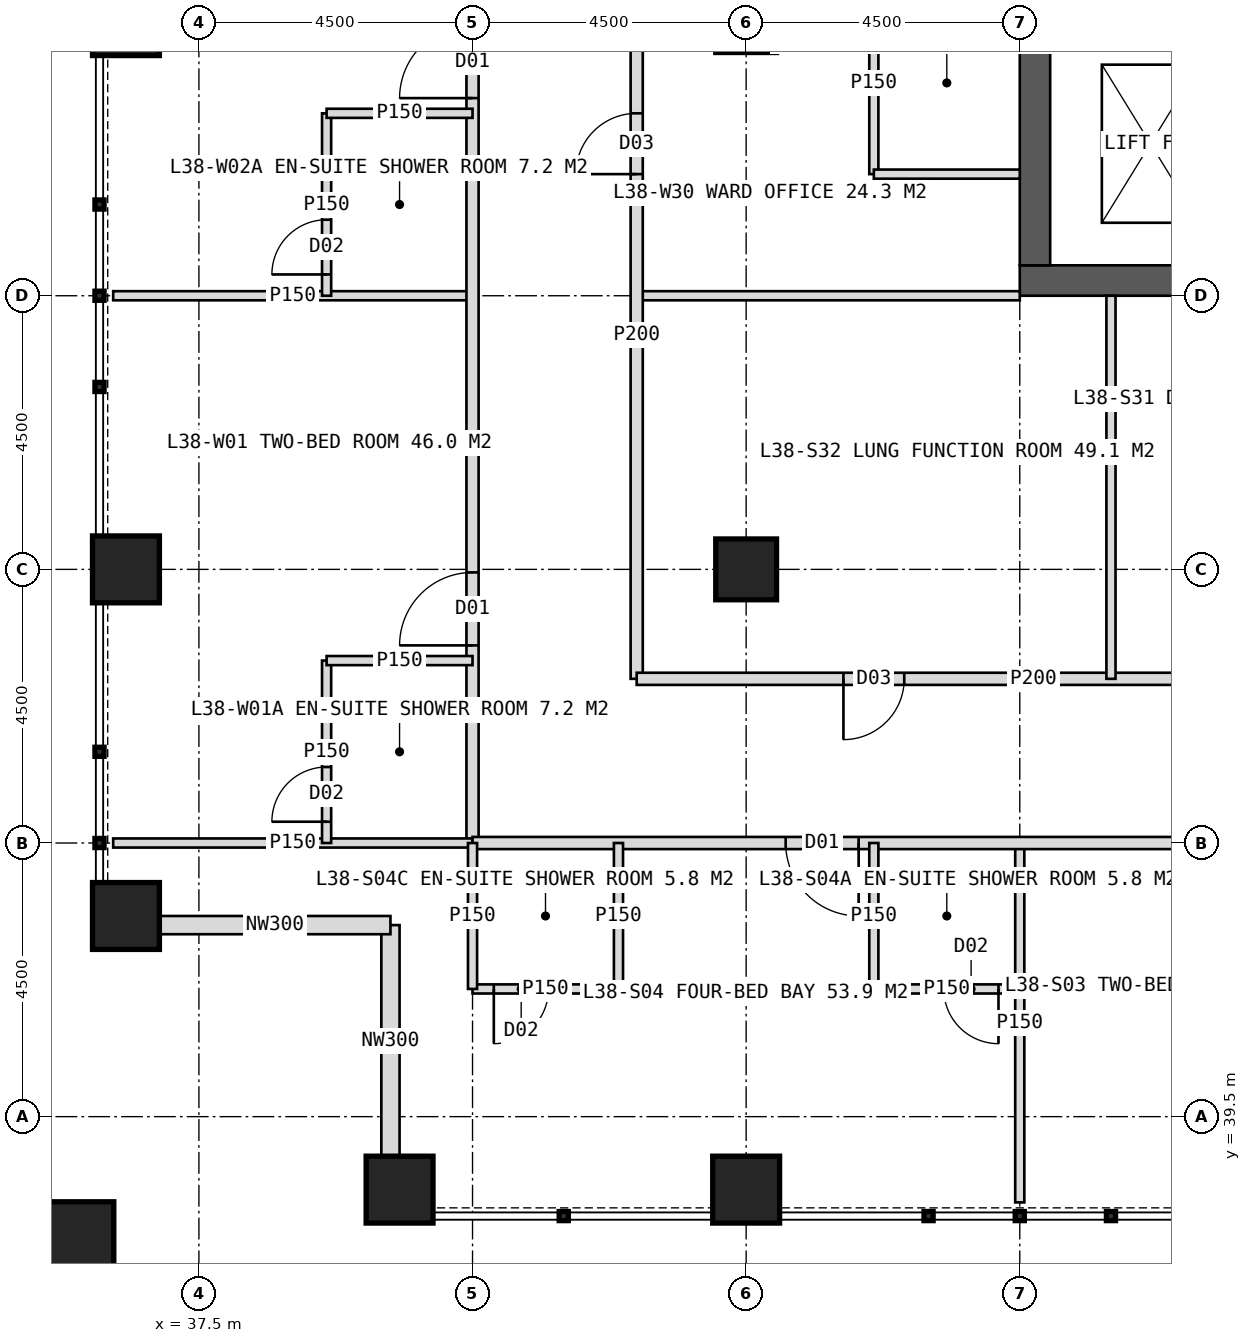
"""IFC4 building model, lengths in metres.
Left out: names, types, materials, properties, quantities, classifications, styles, units other than length and angle.
Written with IfcOpenShell. Run it as: python <this file> out.ifc"""

import sys

from ifc_helpers import new_model, si_unit, direction, frame, frame_2d, origin, origin_2d, place, context, subcontext, project, spatial, rectangle, hollow_rectangle, extrude, element, fill, save


model = new_model("IFC4")
c1 = context("Model", 3, precision=1e-05, world=origin(), true_north=direction((0.0, 1.0)))
c2 = subcontext(c1, "Body", "Model", "MODEL_VIEW")
j1 = project(units=[si_unit("LENGTHUNIT", "METRE"), si_unit("PLANEANGLEUNIT", "RADIAN")], contexts=[c1])
p1 = place(None, origin())
s1 = spatial("IfcSite", under=j1, at=p1, CompositionType="ELEMENT")
p2 = place(p1, origin())
s2 = spatial("IfcBuilding", under=s1, at=p2, CompositionType="ELEMENT")
p3 = place(p2, frame((0.0, 0.0, 160.0)))
s3 = spatial("IfcBuildingStorey", under=s2, at=p3, CompositionType="ELEMENT", Elevation=160.0)
p4 = place(p3, frame((51.0, 53.25, 0.0), z_axis=(0.0, 0.0, 1.0), x_axis=(1.0, 0.0, 0.0)))
e1 = element("IfcWall", 1, at=p4, inside=s3, PredefinedType="SHEAR", context=c2, shape_type="SweptSolid", body=[
    extrude(rectangle(XDim=18.0, YDim=0.5, at=frame_2d((9.0, 0.0))), origin(), (0.0, 0.0, 1.0), 4.0),
])
p5 = place(p4, frame((8.1, 0.0, 0.0)))
e2 = element("IfcOpeningElement", 2, at=p5, cuts=e1, PredefinedType="OPENING", context=c2, shape_type="SweptSolid", body=[
    extrude(rectangle(XDim=1.8, YDim=2.2, at=frame_2d((0.9, 1.1))), frame((0.0, 0.26, 0.0), z_axis=(0.0, -1.0, 0.0), x_axis=(1.0, 0.0, 0.0)), (0.0, 0.0, 1.0), 0.52),
])
p6 = place(p3, frame((51.25, 53.5, 0.0), z_axis=(0.0, 0.0, 1.0), x_axis=(0.0, 1.0, 0.0)))
e3 = element("IfcWall", 3, at=p6, inside=s3, PredefinedType="SHEAR", context=c2, shape_type="SweptSolid", body=[
    extrude(rectangle(XDim=17.0, YDim=0.5, at=frame_2d((8.5, 0.0))), origin(), (0.0, 0.0, 1.0), 4.0),
])
p7 = place(p6, frame((6.0, 0.0, 0.0)))
e4 = element("IfcOpeningElement", 4, at=p7, cuts=e3, PredefinedType="OPENING", context=c2, shape_type="SweptSolid", body=[
    extrude(rectangle(XDim=1.5, YDim=2.2, at=frame_2d((0.75, 1.1))), frame((0.0, 0.26, 0.0), z_axis=(0.0, -1.0, 0.0), x_axis=(1.0, 0.0, 0.0)), (0.0, 0.0, 1.0), 0.52),
])
p8 = place(p3, frame((46.5, 48.5, 0.0), z_axis=(0.0, 0.0, 1.0), x_axis=(1.0, 0.0, 0.0)))
e5 = element("IfcColumn", 5, at=p8, inside=s3, PredefinedType="COLUMN", context=c2, shape_type="SweptSolid", body=[
    extrude(hollow_rectangle(XDim=1.0, YDim=1.0, WallThickness=0.1, at=origin_2d()), origin(), (0.0, 0.0, 1.0), 4.0),
])
for number, where, z_axis, x_axis in (
    (6, (40.8, 38.3, 0.0), (0.0, 0.0, 1.0), (1.0, 0.0, 0.0)),
    (7, (36.3, 42.8, 0.0), (0.0, 0.0, 1.0), (1.0, 0.0, 0.0)),
    (8, (46.5, 38.3, 0.0), (0.0, 0.0, 1.0), (1.0, 0.0, 0.0)),
    (9, (36.3, 48.5, 0.0), (0.0, 0.0, 1.0), (1.0, 0.0, 0.0)),
    (10, (36.3, 57.5, 0.0), (0.0, 0.0, 1.0), (1.0, 0.0, 0.0)),
):
    element("IfcColumn", number, at=place(p3, frame(where, z_axis=z_axis, x_axis=x_axis)), inside=s3, PredefinedType="COLUMN", context=c2, shape_type="SweptSolid", body=[
        extrude(hollow_rectangle(XDim=1.1, YDim=1.1, WallThickness=0.1, at=origin_2d()), origin(), (0.0, 0.0, 1.0), 4.0),
    ])
p9 = place(p3, frame((35.4, 37.4, 0.0), z_axis=(0.0, 0.0, 1.0), x_axis=(1.0, 0.0, 0.0)))
e11 = element("IfcColumn", 11, at=p9, inside=s3, PredefinedType="COLUMN", context=c2, shape_type="SweptSolid", body=[
    extrude(hollow_rectangle(XDim=1.4, YDim=1.4, WallThickness=0.08, at=origin_2d()), origin(), (0.0, 0.0, 1.0), 4.0),
])
for number, where, z_axis, x_axis in (
    (12, (40.65, 38.85, 0.0), (0.0, 0.0, 1.0), (0.0, 1.0, 0.0)),
    (13, (40.65, 42.65, 0.0), (0.0, 0.0, 1.0), (-1.0, 0.0, 0.0)),
):
    element("IfcWall", number, at=place(p3, frame(where, z_axis=z_axis, x_axis=x_axis)), inside=s3, PredefinedType="ELEMENTEDWALL", context=c2, shape_type="SweptSolid", body=[
        extrude(rectangle(XDim=3.8, YDim=0.3, at=frame_2d((1.9, 0.0))), origin(), (0.0, 0.0, 1.0), 4.0),
    ])
p10 = place(p3, frame((42.0, 53.0, 0.0), z_axis=(0.0, 0.0, 1.0), x_axis=(-1.0, 0.0, 0.0)))
e14 = element("IfcWall", 14, at=p10, inside=s3, PredefinedType="PARTITIONING", context=c2, shape_type="SweptSolid", body=[
    extrude(rectangle(XDim=5.91, YDim=0.15, at=frame_2d((2.955, 0.0))), origin(), (0.0, 0.0, 1.0), 3.75),
])
p11 = place(p3, frame((42.0, 44.0, 0.0), z_axis=(0.0, 0.0, 1.0), x_axis=(0.0, 1.0, 0.0)))
e15 = element("IfcWall", 15, at=p11, inside=s3, PredefinedType="PARTITIONING", context=c2, shape_type="SweptSolid", body=[
    extrude(rectangle(XDim=36.0, YDim=0.2, at=frame_2d((18.0, 0.0))), origin(), (0.0, 0.0, 1.0), 3.75),
])
p12 = place(p11, frame((3.25, 0.0, 0.0)))
e16 = element("IfcOpeningElement", 16, at=p12, cuts=e15, PredefinedType="OPENING", context=c2, shape_type="SweptSolid", body=[
    extrude(rectangle(XDim=1.2, YDim=2.2, at=frame_2d((0.6, 1.1))), frame((0.0, 0.11, 0.0), z_axis=(0.0, -1.0, 0.0), x_axis=(1.0, 0.0, 0.0)), (0.0, 0.0, 1.0), 0.22),
])
p13 = place(p11, frame((12.25, 0.0, 0.0)))
e17 = element("IfcOpeningElement", 17, at=p13, cuts=e15, PredefinedType="OPENING", context=c2, shape_type="SweptSolid", body=[
    extrude(rectangle(XDim=1.2, YDim=2.2, at=frame_2d((0.6, 1.1))), frame((0.0, 0.11, 0.0), z_axis=(0.0, -1.0, 0.0), x_axis=(1.0, 0.0, 0.0)), (0.0, 0.0, 1.0), 0.22),
])
p14 = place(p11, frame((21.25, 0.0, 0.0)))
e18 = element("IfcOpeningElement", 18, at=p14, cuts=e15, PredefinedType="OPENING", context=c2, shape_type="SweptSolid", body=[
    extrude(rectangle(XDim=1.2, YDim=2.2, at=frame_2d((0.6, 1.1))), frame((0.0, 0.11, 0.0), z_axis=(0.0, -1.0, 0.0), x_axis=(1.0, 0.0, 0.0)), (0.0, 0.0, 1.0), 0.22),
])
p15 = place(p11, frame((31.75, 0.0, 0.0)))
e19 = element("IfcOpeningElement", 19, at=p15, cuts=e15, PredefinedType="OPENING", context=c2, shape_type="SweptSolid", body=[
    extrude(rectangle(XDim=1.2, YDim=2.2, at=frame_2d((0.6, 1.1))), frame((0.0, 0.11, 0.0), z_axis=(0.0, -1.0, 0.0), x_axis=(1.0, 0.0, 0.0)), (0.0, 0.0, 1.0), 0.22),
])
p16 = place(p3, frame((42.0, 44.0, 0.0), z_axis=(0.0, 0.0, 1.0), x_axis=(-1.0, 0.0, 0.0)))
e20 = element("IfcWall", 20, at=p16, inside=s3, PredefinedType="PARTITIONING", context=c2, shape_type="SweptSolid", body=[
    extrude(rectangle(XDim=5.91, YDim=0.15, at=frame_2d((2.955, 0.0))), origin(), (0.0, 0.0, 1.0), 3.75),
])
p17 = place(p3, frame((39.6, 44.0, 0.0), z_axis=(0.0, 0.0, 1.0), x_axis=(0.0, 1.0, 0.0)))
e21 = element("IfcWall", 21, at=p17, inside=s3, PredefinedType="PARTITIONING", context=c2, shape_type="SweptSolid", body=[
    extrude(rectangle(XDim=3.0, YDim=0.15, at=frame_2d((1.5, 0.0))), origin(), (0.0, 0.0, 1.0), 3.75),
])
p18 = place(p17, frame((0.35, 0.0, 0.0)))
e22 = element("IfcOpeningElement", 22, at=p18, cuts=e21, PredefinedType="OPENING", context=c2, shape_type="SweptSolid", body=[
    extrude(rectangle(XDim=0.9, YDim=2.1, at=frame_2d((0.45, 1.05))), frame((0.0, 0.085, 0.0), z_axis=(0.0, -1.0, 0.0), x_axis=(1.0, 0.0, 0.0)), (0.0, 0.0, 1.0), 0.17),
])
p19 = place(p3, frame((42.0, 47.0, 0.0), z_axis=(0.0, 0.0, 1.0), x_axis=(-1.0, 0.0, 0.0)))
e23 = element("IfcWall", 23, at=p19, inside=s3, PredefinedType="PARTITIONING", context=c2, shape_type="SweptSolid", body=[
    extrude(rectangle(XDim=2.4, YDim=0.15, at=frame_2d((1.2, 0.0))), origin(), (0.0, 0.0, 1.0), 3.75),
])
p20 = place(p3, frame((39.6, 53.0, 0.0), z_axis=(0.0, 0.0, 1.0), x_axis=(0.0, 1.0, 0.0)))
e24 = element("IfcWall", 24, at=p20, inside=s3, PredefinedType="PARTITIONING", context=c2, shape_type="SweptSolid", body=[
    extrude(rectangle(XDim=3.0, YDim=0.15, at=frame_2d((1.5, 0.0))), origin(), (0.0, 0.0, 1.0), 3.75),
])
p21 = place(p20, frame((0.35, 0.0, 0.0)))
e25 = element("IfcOpeningElement", 25, at=p21, cuts=e24, PredefinedType="OPENING", context=c2, shape_type="SweptSolid", body=[
    extrude(rectangle(XDim=0.9, YDim=2.1, at=frame_2d((0.45, 1.05))), frame((0.0, 0.085, 0.0), z_axis=(0.0, -1.0, 0.0), x_axis=(1.0, 0.0, 0.0)), (0.0, 0.0, 1.0), 0.17),
])
p22 = place(p3, frame((42.0, 56.0, 0.0), z_axis=(0.0, 0.0, 1.0), x_axis=(-1.0, 0.0, 0.0)))
e26 = element("IfcWall", 26, at=p22, inside=s3, PredefinedType="PARTITIONING", context=c2, shape_type="SweptSolid", body=[
    extrude(rectangle(XDim=2.4, YDim=0.15, at=frame_2d((1.2, 0.0))), origin(), (0.0, 0.0, 1.0), 3.75),
])
p23 = place(p3, frame((51.0, 53.0, 0.0), z_axis=(0.0, 0.0, 1.0), x_axis=(-1.0, 0.0, 0.0)))
e27 = element("IfcWall", 27, at=p23, inside=s3, PredefinedType="PARTITIONING", context=c2, shape_type="SweptSolid", body=[
    extrude(rectangle(XDim=6.3, YDim=0.15, at=frame_2d((3.15, 0.0))), origin(), (0.0, 0.0, 1.0), 3.75),
])
p24 = place(p3, frame((44.7, 46.7, 0.0), z_axis=(0.0, 0.0, 1.0), x_axis=(0.0, 1.0, 0.0)))
e28 = element("IfcWall", 28, at=p24, inside=s3, PredefinedType="PARTITIONING", context=c2, shape_type="SweptSolid", body=[
    extrude(rectangle(XDim=11.3, YDim=0.2, at=frame_2d((5.65, 0.0))), origin(), (0.0, 0.0, 1.0), 3.75),
])
p25 = place(p24, frame((8.3, 0.0, 0.0)))
e29 = element("IfcOpeningElement", 29, at=p25, cuts=e28, PredefinedType="OPENING", context=c2, shape_type="SweptSolid", body=[
    extrude(rectangle(XDim=1.0, YDim=2.1, at=frame_2d((0.5, 1.05))), frame((0.0, 0.11, 0.0), z_axis=(0.0, -1.0, 0.0), x_axis=(1.0, 0.0, 0.0)), (0.0, 0.0, 1.0), 0.22),
])
p26 = place(p3, frame((48.6, 55.0, 0.0), z_axis=(0.0, 0.0, 1.0), x_axis=(0.0, 1.0, 0.0)))
e30 = element("IfcWall", 30, at=p26, inside=s3, PredefinedType="PARTITIONING", context=c2, shape_type="SweptSolid", body=[
    extrude(rectangle(XDim=3.0, YDim=0.15, at=frame_2d((1.5, 0.0))), origin(), (0.0, 0.0, 1.0), 3.75),
])
p27 = place(p3, frame((51.0, 55.0, 0.0), z_axis=(0.0, 0.0, 1.0), x_axis=(-1.0, 0.0, 0.0)))
e31 = element("IfcWall", 31, at=p27, inside=s3, PredefinedType="PARTITIONING", context=c2, shape_type="SweptSolid", body=[
    extrude(rectangle(XDim=2.4, YDim=0.15, at=frame_2d((1.2, 0.0))), origin(), (0.0, 0.0, 1.0), 3.75),
])
p28 = place(p3, frame((51.0, 44.0, 0.0), z_axis=(0.0, 0.0, 1.0), x_axis=(0.0, -1.0, 0.0)))
e32 = element("IfcWall", 32, at=p28, inside=s3, PredefinedType="PARTITIONING", context=c2, shape_type="SweptSolid", body=[
    extrude(rectangle(XDim=5.91, YDim=0.15, at=frame_2d((2.955, 0.0))), origin(), (0.0, 0.0, 1.0), 3.75),
])
p29 = place(p3, frame((78.0, 44.0, 0.0), z_axis=(0.0, 0.0, 1.0), x_axis=(-1.0, 0.0, 0.0)))
e33 = element("IfcWall", 33, at=p29, inside=s3, PredefinedType="PARTITIONING", context=c2, shape_type="SweptSolid", body=[
    extrude(rectangle(XDim=36.0, YDim=0.2, at=frame_2d((18.0, 0.0))), origin(), (0.0, 0.0, 1.0), 3.75),
])
p30 = place(p29, frame((3.25, 0.0, 0.0)))
e34 = element("IfcOpeningElement", 34, at=p30, cuts=e33, PredefinedType="OPENING", context=c2, shape_type="SweptSolid", body=[
    extrude(rectangle(XDim=1.2, YDim=2.2, at=frame_2d((0.6, 1.1))), frame((0.0, 0.11, 0.0), z_axis=(0.0, -1.0, 0.0), x_axis=(1.0, 0.0, 0.0)), (0.0, 0.0, 1.0), 0.22),
])
p31 = place(p29, frame((12.25, 0.0, 0.0)))
e35 = element("IfcOpeningElement", 35, at=p31, cuts=e33, PredefinedType="OPENING", context=c2, shape_type="SweptSolid", body=[
    extrude(rectangle(XDim=1.2, YDim=2.2, at=frame_2d((0.6, 1.1))), frame((0.0, 0.11, 0.0), z_axis=(0.0, -1.0, 0.0), x_axis=(1.0, 0.0, 0.0)), (0.0, 0.0, 1.0), 0.22),
])
p32 = place(p29, frame((21.25, 0.0, 0.0)))
e36 = element("IfcOpeningElement", 36, at=p32, cuts=e33, PredefinedType="OPENING", context=c2, shape_type="SweptSolid", body=[
    extrude(rectangle(XDim=1.2, YDim=2.2, at=frame_2d((0.6, 1.1))), frame((0.0, 0.11, 0.0), z_axis=(0.0, -1.0, 0.0), x_axis=(1.0, 0.0, 0.0)), (0.0, 0.0, 1.0), 0.22),
])
p33 = place(p29, frame((29.65, 0.0, 0.0)))
e37 = element("IfcOpeningElement", 37, at=p33, cuts=e33, PredefinedType="OPENING", context=c2, shape_type="SweptSolid", body=[
    extrude(rectangle(XDim=1.2, YDim=2.2, at=frame_2d((0.6, 1.1))), frame((0.0, 0.11, 0.0), z_axis=(0.0, -1.0, 0.0), x_axis=(1.0, 0.0, 0.0)), (0.0, 0.0, 1.0), 0.22),
])
p34 = place(p3, frame((51.0, 41.6, 0.0), z_axis=(0.0, 0.0, 1.0), x_axis=(-1.0, 0.0, 0.0)))
e38 = element("IfcWall", 38, at=p34, inside=s3, PredefinedType="PARTITIONING", context=c2, shape_type="SweptSolid", body=[
    extrude(rectangle(XDim=2.4, YDim=0.15, at=frame_2d((1.2, 0.0))), origin(), (0.0, 0.0, 1.0), 3.75),
])
p35 = place(p34, frame((0.35, 0.0, 0.0)))
e39 = element("IfcOpeningElement", 39, at=p35, cuts=e38, PredefinedType="OPENING", context=c2, shape_type="SweptSolid", body=[
    extrude(rectangle(XDim=0.9, YDim=2.1, at=frame_2d((0.45, 1.05))), frame((0.0, 0.085, 0.0), z_axis=(0.0, -1.0, 0.0), x_axis=(1.0, 0.0, 0.0)), (0.0, 0.0, 1.0), 0.17),
])
p36 = place(p3, frame((48.6, 44.0, 0.0), z_axis=(0.0, 0.0, 1.0), x_axis=(0.0, -1.0, 0.0)))
e40 = element("IfcWall", 40, at=p36, inside=s3, PredefinedType="PARTITIONING", context=c2, shape_type="SweptSolid", body=[
    extrude(rectangle(XDim=2.4, YDim=0.15, at=frame_2d((1.2, 0.0))), origin(), (0.0, 0.0, 1.0), 3.75),
])
p37 = place(p3, frame((44.4, 41.6, 0.0), z_axis=(0.0, 0.0, 1.0), x_axis=(-1.0, 0.0, 0.0)))
e41 = element("IfcWall", 41, at=p37, inside=s3, PredefinedType="PARTITIONING", context=c2, shape_type="SweptSolid", body=[
    extrude(rectangle(XDim=2.4, YDim=0.15, at=frame_2d((1.2, 0.0))), origin(), (0.0, 0.0, 1.0), 3.75),
])
p38 = place(p37, frame((1.15, 0.0, 0.0)))
e42 = element("IfcOpeningElement", 42, at=p38, cuts=e41, PredefinedType="OPENING", context=c2, shape_type="SweptSolid", body=[
    extrude(rectangle(XDim=0.9, YDim=2.1, at=frame_2d((0.45, 1.05))), frame((0.0, 0.085, 0.0), z_axis=(0.0, -1.0, 0.0), x_axis=(1.0, 0.0, 0.0)), (0.0, 0.0, 1.0), 0.17),
])
for number, where, z_axis, x_axis in (
    (43, (44.4, 44.0, 0.0), (0.0, 0.0, 1.0), (0.0, -1.0, 0.0)),
    (44, (42.0, 44.0, 0.0), (0.0, 0.0, 1.0), (0.0, -1.0, 0.0)),
):
    element("IfcWall", number, at=place(p3, frame(where, z_axis=z_axis, x_axis=x_axis)), inside=s3, PredefinedType="PARTITIONING", context=c2, shape_type="SweptSolid", body=[
        extrude(rectangle(XDim=2.4, YDim=0.15, at=frame_2d((1.2, 0.0))), origin(), (0.0, 0.0, 1.0), 3.75),
    ])
p39 = place(p3, frame((57.75, 46.7, 0.0), z_axis=(0.0, 0.0, 1.0), x_axis=(-1.0, 0.0, 0.0)))
e45 = element("IfcWall", 45, at=p39, inside=s3, PredefinedType="PARTITIONING", context=c2, shape_type="SweptSolid", body=[
    extrude(rectangle(XDim=13.05, YDim=0.2, at=frame_2d((6.525, 0.0))), origin(), (0.0, 0.0, 1.0), 3.75),
])
p40 = place(p39, frame((2.125, 0.0, 0.0)))
e46 = element("IfcOpeningElement", 46, at=p40, cuts=e45, PredefinedType="OPENING", context=c2, shape_type="SweptSolid", body=[
    extrude(rectangle(XDim=1.0, YDim=2.1, at=frame_2d((0.5, 1.05))), frame((0.0, 0.11, 0.0), z_axis=(0.0, -1.0, 0.0), x_axis=(1.0, 0.0, 0.0)), (0.0, 0.0, 1.0), 0.22),
])
p41 = place(p39, frame((8.65, 0.0, 0.0)))
e47 = element("IfcOpeningElement", 47, at=p41, cuts=e45, PredefinedType="OPENING", context=c2, shape_type="SweptSolid", body=[
    extrude(rectangle(XDim=1.0, YDim=2.1, at=frame_2d((0.5, 1.05))), frame((0.0, 0.11, 0.0), z_axis=(0.0, -1.0, 0.0), x_axis=(1.0, 0.0, 0.0)), (0.0, 0.0, 1.0), 0.22),
])
p42 = place(p3, frame((52.5, 53.0, 0.0), z_axis=(0.0, 0.0, 1.0), x_axis=(0.0, -1.0, 0.0)))
e48 = element("IfcWall", 48, at=p42, inside=s3, PredefinedType="PARTITIONING", context=c2, shape_type="SweptSolid", body=[
    extrude(rectangle(XDim=6.3, YDim=0.15, at=frame_2d((3.15, 0.0))), origin(), (0.0, 0.0, 1.0), 3.75),
])
p43 = place(p12, origin())
e49 = element("IfcDoor", 49, at=p43, inside=s3, OperationType="SINGLE_SWING_LEFT", PredefinedType="DOOR", context=c2, shape_type="SweptSolid", body=[
    extrude(rectangle(XDim=1.2, YDim=2.2, at=frame_2d((0.6, 1.1))), frame((0.0, 0.025, 0.0), z_axis=(0.0, -1.0, 0.0), x_axis=(1.0, 0.0, 0.0)), (0.0, 0.0, 1.0), 0.05),
])
fill(e16, e49)
p44 = place(p18, origin())
e50 = element("IfcDoor", 50, at=p44, inside=s3, OperationType="SINGLE_SWING_LEFT", PredefinedType="DOOR", context=c2, shape_type="SweptSolid", body=[
    extrude(rectangle(XDim=0.9, YDim=2.1, at=frame_2d((0.45, 1.05))), frame((0.0, 0.025, 0.0), z_axis=(0.0, -1.0, 0.0), x_axis=(1.0, 0.0, 0.0)), (0.0, 0.0, 1.0), 0.05),
])
fill(e22, e50)
p45 = place(p13, origin())
e51 = element("IfcDoor", 51, at=p45, inside=s3, OperationType="SINGLE_SWING_LEFT", PredefinedType="DOOR", context=c2, shape_type="SweptSolid", body=[
    extrude(rectangle(XDim=1.2, YDim=2.2, at=frame_2d((0.6, 1.1))), frame((0.0, 0.025, 0.0), z_axis=(0.0, -1.0, 0.0), x_axis=(1.0, 0.0, 0.0)), (0.0, 0.0, 1.0), 0.05),
])
fill(e17, e51)
p46 = place(p21, origin())
e52 = element("IfcDoor", 52, at=p46, inside=s3, OperationType="SINGLE_SWING_LEFT", PredefinedType="DOOR", context=c2, shape_type="SweptSolid", body=[
    extrude(rectangle(XDim=0.9, YDim=2.1, at=frame_2d((0.45, 1.05))), frame((0.0, 0.025, 0.0), z_axis=(0.0, -1.0, 0.0), x_axis=(1.0, 0.0, 0.0)), (0.0, 0.0, 1.0), 0.05),
])
fill(e25, e52)
p47 = place(p25, origin())
e53 = element("IfcDoor", 53, at=p47, inside=s3, OperationType="SINGLE_SWING_LEFT", PredefinedType="DOOR", context=c2, shape_type="SweptSolid", body=[
    extrude(rectangle(XDim=1.0, YDim=2.1, at=frame_2d((0.5, 1.05))), frame((0.0, 0.025, 0.0), z_axis=(0.0, -1.0, 0.0), x_axis=(1.0, 0.0, 0.0)), (0.0, 0.0, 1.0), 0.05),
])
fill(e29, e53)
p48 = place(p33, origin())
e54 = element("IfcDoor", 54, at=p48, inside=s3, OperationType="SINGLE_SWING_LEFT", PredefinedType="DOOR", context=c2, shape_type="SweptSolid", body=[
    extrude(rectangle(XDim=1.2, YDim=2.2, at=frame_2d((0.6, 1.1))), frame((0.0, 0.025, 0.0), z_axis=(0.0, -1.0, 0.0), x_axis=(1.0, 0.0, 0.0)), (0.0, 0.0, 1.0), 0.05),
])
fill(e37, e54)
p49 = place(p35, origin())
e55 = element("IfcDoor", 55, at=p49, inside=s3, OperationType="SINGLE_SWING_LEFT", PredefinedType="DOOR", context=c2, shape_type="SweptSolid", body=[
    extrude(rectangle(XDim=0.9, YDim=2.1, at=frame_2d((0.45, 1.05))), frame((0.0, 0.025, 0.0), z_axis=(0.0, -1.0, 0.0), x_axis=(1.0, 0.0, 0.0)), (0.0, 0.0, 1.0), 0.05),
])
fill(e39, e55)
p50 = place(p38, origin())
e56 = element("IfcDoor", 56, at=p50, inside=s3, OperationType="SINGLE_SWING_RIGHT", PredefinedType="DOOR", context=c2, shape_type="SweptSolid", body=[
    extrude(rectangle(XDim=0.9, YDim=2.1, at=frame_2d((0.45, 1.05))), frame((0.0, 0.025, 0.0), z_axis=(0.0, -1.0, 0.0), x_axis=(1.0, 0.0, 0.0)), (0.0, 0.0, 1.0), 0.05),
])
fill(e42, e56)
p51 = place(p41, origin())
e57 = element("IfcDoor", 57, at=p51, inside=s3, OperationType="SINGLE_SWING_RIGHT", PredefinedType="DOOR", context=c2, shape_type="SweptSolid", body=[
    extrude(rectangle(XDim=1.0, YDim=2.1, at=frame_2d((0.5, 1.05))), frame((0.0, 0.025, 0.0), z_axis=(0.0, -1.0, 0.0), x_axis=(1.0, 0.0, 0.0)), (0.0, 0.0, 1.0), 0.05),
])
fill(e47, e57)
save(model, sys.argv[1])
